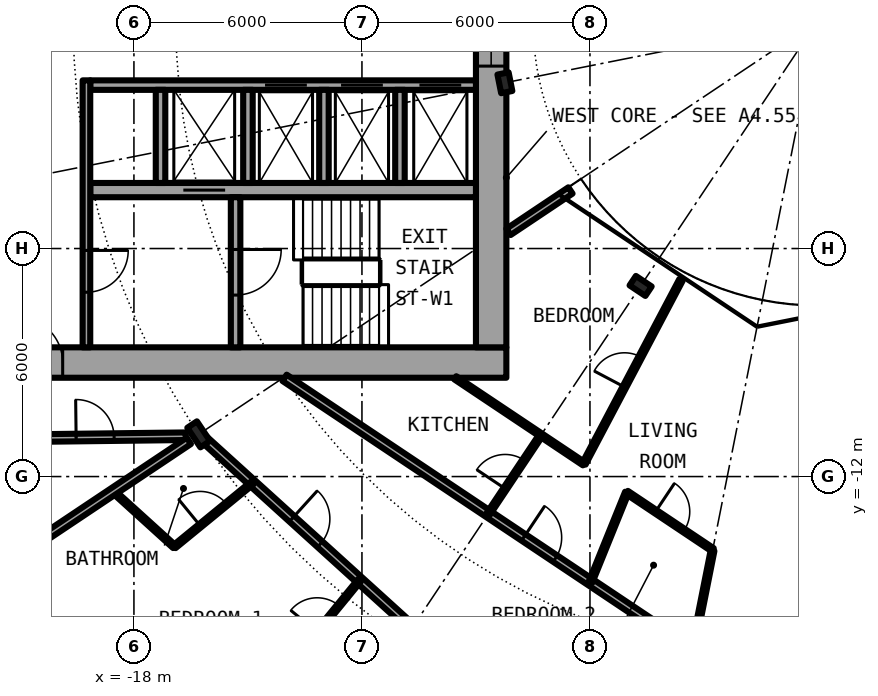
"""IFC4 building model, lengths in metres.
Left out: names, types, materials, properties, quantities, classifications, styles, units other than length and angle.
Written with IfcOpenShell. Run it as: python <this file> out.ifc"""

import sys

from ifc_helpers import new_model, si_unit, direction, frame, frame_2d, origin, origin_2d, place, context, subcontext, project, spatial, rectangle, i_section, extrude, element, fill, save


model = new_model("IFC4")
c1 = context("Model", 3, precision=1e-05, world=origin(), true_north=direction((0.0, 1.0)))
c2 = subcontext(c1, "Body", "Model", "MODEL_VIEW")
j1 = project(units=[si_unit("LENGTHUNIT", "METRE"), si_unit("PLANEANGLEUNIT", "RADIAN")], contexts=[c1])
p1 = place(None, origin())
s1 = spatial("IfcSite", under=j1, at=p1, CompositionType="ELEMENT")
p2 = place(p1, origin())
s2 = spatial("IfcBuilding", under=s1, at=p2, CompositionType="ELEMENT")
p3 = place(p2, frame((0.0, 0.0, 28.9)))
s3 = spatial("IfcBuildingStorey", under=s2, at=p3, CompositionType="ELEMENT", Elevation=28.9)
p4 = place(p3, frame((-16.297, -10.889, 0.0), z_axis=(0.0, 0.0, 1.0), x_axis=(-0.831469612303, -0.55557023302, 0.0)))
e1 = element("IfcColumn", 1, at=p4, inside=s3, PredefinedType="COLUMN", context=c2, shape_type="SweptSolid", body=[
    extrude(i_section(OverallWidth=0.305, OverallDepth=0.62, WebThickness=0.021, FlangeThickness=0.04, FilletRadius=0.027, at=origin_2d()), origin(), (0.0, 0.0, 1.0), 3.05),
])
for number, where, z_axis, x_axis in (
    (2, (-8.239, -1.639, 0.0), (0.0, 0.0, 1.0), (-0.981, -0.195, 0.0)),
    (3, (-4.667, -6.984, 0.0), (0.0, 0.0, 1.0), (-0.556, -0.831, 0.0)),
):
    element("IfcColumn", number, at=place(p3, frame(where, z_axis=z_axis, x_axis=x_axis)), inside=s3, PredefinedType="COLUMN", context=c2, shape_type="SweptSolid", body=[
        extrude(i_section(OverallWidth=0.3, OverallDepth=0.5, WebThickness=0.014, FlangeThickness=0.028, FilletRadius=0.027, at=origin_2d()), origin(), (0.0, 0.0, 1.0), 3.05),
    ])
p5 = place(p3, frame((-22.699, -15.167, 0.0), z_axis=(0.0, 0.0, 1.0), x_axis=(0.634382322723, -0.773019449054, 0.0)))
e4 = element("IfcWall", 4, at=p5, inside=s3, PredefinedType="SOLIDWALL", context=c2, shape_type="SweptSolid", body=[
    extrude(rectangle(XDim=5.352, YDim=0.25, at=frame_2d((2.676, 0.0))), origin(), (0.0, 0.0, 1.0), 2.7),
])
p6 = place(p5, frame((0.441, 0.0, 0.3)))
e5 = element("IfcOpeningElement", 5, at=p6, cuts=e4, PredefinedType="OPENING", context=c2, shape_type="SweptSolid", body=[
    extrude(rectangle(XDim=1.8, YDim=2.1, at=frame_2d((0.9, 1.05))), frame((0.0, 0.135, 0.0), z_axis=(0.0, -1.0, 0.0), x_axis=(1.0, 0.0, 0.0)), (0.0, 0.0, 1.0), 0.27),
])
p7 = place(p5, frame((3.51, 0.0, 0.0)))
e6 = element("IfcOpeningElement", 6, at=p7, cuts=e4, PredefinedType="OPENING", context=c2, shape_type="SweptSolid", body=[
    extrude(rectangle(XDim=1.0, YDim=2.2, at=frame_2d((0.5, 1.1))), frame((0.0, 0.135, 0.0), z_axis=(0.0, -1.0, 0.0), x_axis=(1.0, 0.0, 0.0)), (0.0, 0.0, 1.0), 0.27),
])
p8 = place(p3, frame((-22.4, -9.0, 0.0), z_axis=(0.0, 0.0, 1.0), x_axis=(1.0, 0.0, 0.0)))
e7 = element("IfcWall", 7, at=p8, inside=s3, PredefinedType="SHEAR", context=c2, shape_type="SweptSolid", body=[
    extrude(rectangle(XDim=14.2, YDim=0.8, at=frame_2d((7.1, 0.0))), origin(), (0.0, 0.0, 1.0), 3.05),
])
p9 = place(p8, frame((1.325, 0.0, 0.0)))
e8 = element("IfcOpeningElement", 8, at=p9, cuts=e7, PredefinedType="OPENING", context=c2, shape_type="SweptSolid", body=[
    extrude(rectangle(XDim=1.2, YDim=2.3, at=frame_2d((0.6, 1.15))), frame((0.0, 0.41, 0.0), z_axis=(0.0, -1.0, 0.0), x_axis=(1.0, 0.0, 0.0)), (0.0, 0.0, 1.0), 0.82),
])
p10 = place(p3, frame((-8.6, 8.6, 0.0), z_axis=(0.0, 0.0, 1.0), x_axis=(0.0, -1.0, 0.0)))
e9 = element("IfcWall", 9, at=p10, inside=s3, PredefinedType="SHEAR", context=c2, shape_type="SweptSolid", body=[
    extrude(rectangle(XDim=17.2, YDim=0.8, at=frame_2d((8.6, 0.0))), origin(), (0.0, 0.0, 1.0), 3.05),
])
p11 = place(p10, frame((7.4, 0.0, 0.1)))
e10 = element("IfcOpeningElement", 10, at=p11, cuts=e9, PredefinedType="OPENING", context=c2, shape_type="SweptSolid", body=[
    extrude(rectangle(XDim=2.4, YDim=2.2, at=frame_2d((1.2, 1.1))), frame((0.0, 0.41, 0.0), z_axis=(0.0, -1.0, 0.0), x_axis=(1.0, 0.0, 0.0)), (0.0, 0.0, 1.0), 0.82),
])
p12 = place(p3, frame((-9.0, -1.7, 0.0), z_axis=(0.0, 0.0, 1.0), x_axis=(-1.0, 0.0, 0.0)))
e11 = element("IfcWall", 11, at=p12, inside=s3, PredefinedType="SHEAR", context=c2, shape_type="SweptSolid", body=[
    extrude(rectangle(XDim=10.15, YDim=0.25, at=frame_2d((5.075, 0.0))), origin(), (0.0, 0.0, 1.0), 3.05),
])
p13 = place(p12, frame((0.387, 0.0, 0.0)))
e12 = element("IfcOpeningElement", 12, at=p13, cuts=e11, PredefinedType="OPENING", context=c2, shape_type="SweptSolid", body=[
    extrude(rectangle(XDim=1.1, YDim=2.3, at=frame_2d((0.55, 1.15))), frame((0.0, 0.135, 0.0), z_axis=(0.0, -1.0, 0.0), x_axis=(1.0, 0.0, 0.0)), (0.0, 0.0, 1.0), 0.27),
])
p14 = place(p12, frame((2.45, 0.0, 0.0)))
e13 = element("IfcOpeningElement", 13, at=p14, cuts=e11, PredefinedType="OPENING", context=c2, shape_type="SweptSolid", body=[
    extrude(rectangle(XDim=1.1, YDim=2.3, at=frame_2d((0.55, 1.15))), frame((0.0, 0.135, 0.0), z_axis=(0.0, -1.0, 0.0), x_axis=(1.0, 0.0, 0.0)), (0.0, 0.0, 1.0), 0.27),
])
p15 = place(p12, frame((4.45, 0.0, 0.0)))
e14 = element("IfcOpeningElement", 14, at=p15, cuts=e11, PredefinedType="OPENING", context=c2, shape_type="SweptSolid", body=[
    extrude(rectangle(XDim=1.1, YDim=2.3, at=frame_2d((0.55, 1.15))), frame((0.0, 0.135, 0.0), z_axis=(0.0, -1.0, 0.0), x_axis=(1.0, 0.0, 0.0)), (0.0, 0.0, 1.0), 0.27),
])
p16 = place(p3, frame((-9.0, -4.462, 0.0), z_axis=(0.0, 0.0, 1.0), x_axis=(-1.0, 0.0, 0.0)))
e15 = element("IfcWall", 15, at=p16, inside=s3, PredefinedType="SHEAR", context=c2, shape_type="SweptSolid", body=[
    extrude(rectangle(XDim=10.15, YDim=0.375, at=frame_2d((5.075, 0.0))), origin(), (0.0, 0.0, 1.0), 3.05),
])
p17 = place(p16, frame((6.6, 0.0, 0.0)))
e16 = element("IfcOpeningElement", 16, at=p17, cuts=e15, PredefinedType="OPENING", context=c2, shape_type="SweptSolid", body=[
    extrude(rectangle(XDim=1.1, YDim=2.3, at=frame_2d((0.55, 1.15))), frame((0.0, 0.198, 0.0), z_axis=(0.0, -1.0, 0.0), x_axis=(1.0, 0.0, 0.0)), (0.0, 0.0, 1.0), 0.395),
])
p18 = place(p3, frame((-15.325, -4.65, 0.0), z_axis=(0.0, 0.0, 1.0), x_axis=(0.0, -1.0, 0.0)))
e17 = element("IfcWall", 17, at=p18, inside=s3, PredefinedType="SHEAR", context=c2, shape_type="SweptSolid", body=[
    extrude(rectangle(XDim=3.95, YDim=0.25, at=frame_2d((1.975, 0.0))), origin(), (0.0, 0.0, 1.0), 3.05),
])
p19 = place(p18, frame((1.375, 0.0, 0.0)))
e18 = element("IfcOpeningElement", 18, at=p19, cuts=e17, PredefinedType="OPENING", context=c2, shape_type="SweptSolid", body=[
    extrude(rectangle(XDim=1.2, YDim=2.3, at=frame_2d((0.6, 1.15))), frame((0.0, 0.135, 0.0), z_axis=(0.0, -1.0, 0.0), x_axis=(1.0, 0.0, 0.0)), (0.0, 0.0, 1.0), 0.27),
])
for number, where, z_axis, x_axis in (
    (19, (-15.0, -1.825, 0.0), (0.0, 0.0, 1.0), (0.0, -1.0, 0.0)),
    (20, (-17.3, -1.825, 0.0), (0.0, 0.0, 1.0), (0.0, -1.0, 0.0)),
):
    element("IfcWall", number, at=place(p3, frame(where, z_axis=z_axis, x_axis=x_axis)), inside=s3, PredefinedType="SOLIDWALL", context=c2, shape_type="SweptSolid", body=[
        extrude(rectangle(XDim=2.45, YDim=0.25, at=frame_2d((1.225, 0.0))), origin(), (0.0, 0.0, 1.0), 2.7),
    ])
p20 = place(p3, frame((-19.25, -1.575, 0.0), z_axis=(0.0, 0.0, 1.0), x_axis=(0.0, -1.0, 0.0)))
e21 = element("IfcWall", 21, at=p20, inside=s3, PredefinedType="SOLIDWALL", context=c2, shape_type="SweptSolid", body=[
    extrude(rectangle(XDim=7.025, YDim=0.2, at=frame_2d((3.513, 0.0))), origin(), (0.0, 0.0, 1.0), 2.7),
])
p21 = place(p20, frame((4.475, 0.0, 0.0)))
e22 = element("IfcOpeningElement", 22, at=p21, cuts=e21, PredefinedType="OPENING", context=c2, shape_type="SweptSolid", body=[
    extrude(rectangle(XDim=1.1, YDim=2.3, at=frame_2d((0.55, 1.15))), frame((0.0, 0.11, 0.0), z_axis=(0.0, -1.0, 0.0), x_axis=(1.0, 0.0, 0.0)), (0.0, 0.0, 1.0), 0.22),
])
for number, where, z_axis, x_axis in (
    (23, (-11.0, -1.825, 0.0), (0.0, 0.0, 1.0), (0.0, -1.0, 0.0)),
    (24, (-13.0, -1.825, 0.0), (0.0, 0.0, 1.0), (0.0, -1.0, 0.0)),
):
    element("IfcWall", number, at=place(p3, frame(where, z_axis=z_axis, x_axis=x_axis)), inside=s3, PredefinedType="SOLIDWALL", context=c2, shape_type="SweptSolid", body=[
        extrude(rectangle(XDim=2.45, YDim=0.25, at=frame_2d((1.225, 0.0))), origin(), (0.0, 0.0, 1.0), 2.7),
    ])
p22 = place(p3, frame((-18.542, -12.389, 0.0), z_axis=(0.0, 0.0, 1.0), x_axis=(0.740836325503, -0.671685595212, 0.0)))
e25 = element("IfcWall", 25, at=p22, inside=s3, PredefinedType="PARTITIONING", context=c2, shape_type="SweptSolid", body=[
    extrude(rectangle(XDim=2.168, YDim=0.1, at=frame_2d((1.084, 0.0))), origin(), (0.0, 0.0, 1.0), 2.7),
])
p23 = place(p3, frame((-16.18, -10.994, 0.0), z_axis=(0.0, 0.0, 1.0), x_axis=(0.74089212117, -0.671624050186, 0.0)))
e26 = element("IfcWall", 26, at=p23, inside=s3, PredefinedType="PARTITIONING", context=c2, shape_type="SweptSolid", body=[
    extrude(rectangle(XDim=9.368, YDim=0.2, at=frame_2d((4.684, 0.0))), origin(), (0.0, 0.0, 1.0), 2.38),
])
p24 = place(p23, frame((3.153, 0.0, 0.0)))
e27 = element("IfcOpeningElement", 27, at=p24, cuts=e26, PredefinedType="OPENING", context=c2, shape_type="SweptSolid", body=[
    extrude(rectangle(XDim=1.0, YDim=2.3, at=frame_2d((0.5, 1.15))), frame((0.0, 0.11, 0.0), z_axis=(0.0, -1.0, 0.0), x_axis=(1.0, 0.0, 0.0)), (0.0, 0.0, 1.0), 0.22),
])
p25 = place(p3, frame((-14.036, -9.402, 0.0), z_axis=(0.0, 0.0, 1.0), x_axis=(0.831561346449, -0.555432918625, 0.0)))
e28 = element("IfcWall", 28, at=p25, inside=s3, PredefinedType="PARTITIONING", context=c2, shape_type="SweptSolid", body=[
    extrude(rectangle(XDim=12.914, YDim=0.2, at=frame_2d((6.457, 0.0))), origin(), (0.0, 0.0, 1.0), 2.7),
])
p26 = place(p25, frame((7.566, 0.0, 0.0)))
e29 = element("IfcOpeningElement", 29, at=p26, cuts=e28, PredefinedType="OPENING", context=c2, shape_type="SweptSolid", body=[
    extrude(rectangle(XDim=1.0, YDim=2.3, at=frame_2d((0.5, 1.15))), frame((0.0, 0.11, 0.0), z_axis=(0.0, -1.0, 0.0), x_axis=(1.0, 0.0, 0.0)), (0.0, 0.0, 1.0), 0.22),
])
p27 = place(p3, frame((-9.545, -9.401, 0.0), z_axis=(0.0, 0.0, 1.0), x_axis=(0.831459707426, -0.555585056429, 0.0)))
e30 = element("IfcWall", 30, at=p27, inside=s3, PredefinedType="PARTITIONING", context=c2, shape_type="SweptSolid", body=[
    extrude(rectangle(XDim=4.073, YDim=0.1, at=frame_2d((2.037, 0.0))), origin(), (0.0, 0.0, 1.0), 2.7),
])
p28 = place(p3, frame((-5.029, -12.418, 0.0), z_axis=(0.0, 0.0, 1.0), x_axis=(0.831538390496, -0.555467285384, 0.0)))
e31 = element("IfcWall", 31, at=p28, inside=s3, PredefinedType="PARTITIONING", context=c2, shape_type="SweptSolid", body=[
    extrude(rectangle(XDim=2.717, YDim=0.1, at=frame_2d((1.358, 0.0))), origin(), (0.0, 0.0, 1.0), 2.7),
])
p29 = place(p28, frame((0.908, 0.0, 0.0)))
e32 = element("IfcOpeningElement", 32, at=p29, cuts=e31, PredefinedType="OPENING", context=c2, shape_type="SweptSolid", body=[
    extrude(rectangle(XDim=0.9, YDim=2.3, at=frame_2d((0.45, 1.15))), frame((0.0, 0.06, 0.0), z_axis=(0.0, -1.0, 0.0), x_axis=(1.0, 0.0, 0.0)), (0.0, 0.0, 1.0), 0.12),
])
p30 = place(p3, frame((-21.675, -11.0, 0.0), z_axis=(0.0, 0.0, 1.0), x_axis=(0.999926652916, 0.012111514691, 0.0)))
e33 = element("IfcWall", 33, at=p30, inside=s3, PredefinedType="PARTITIONING", context=c2, shape_type="SweptSolid", body=[
    extrude(rectangle(XDim=5.04, YDim=0.2, at=frame_2d((2.52, 0.0))), origin(), (0.0, 0.0, 1.0), 2.7),
])
p31 = place(p30, frame((2.154, 0.0, 0.0)))
e34 = element("IfcOpeningElement", 34, at=p31, cuts=e33, PredefinedType="OPENING", context=c2, shape_type="SweptSolid", body=[
    extrude(rectangle(XDim=1.0, YDim=2.3, at=frame_2d((0.5, 1.15))), frame((0.0, 0.11, 0.0), z_axis=(0.0, -1.0, 0.0), x_axis=(1.0, 0.0, 0.0)), (0.0, 0.0, 1.0), 0.22),
])
p32 = place(p3, frame((-6.513, -4.472, 0.0), z_axis=(0.0, 0.0, 1.0), x_axis=(-0.831417956244, -0.555647533996, 0.0)))
e35 = element("IfcWall", 35, at=p32, inside=s3, PredefinedType="PARTITIONING", context=c2, shape_type="SweptSolid", body=[
    extrude(rectangle(XDim=1.962, YDim=0.2, at=frame_2d((0.981, 0.0))), origin(), (0.0, 0.0, 1.0), 2.7),
])
p33 = place(p3, frame((-22.595, -15.097, 0.0), z_axis=(0.0, 0.0, 1.0), x_axis=(0.831465568067, 0.555576285599, 0.0)))
e36 = element("IfcWall", 36, at=p33, inside=s3, PredefinedType="PARTITIONING", context=c2, shape_type="SweptSolid", body=[
    extrude(rectangle(XDim=7.264, YDim=0.2, at=frame_2d((3.632, 0.0))), origin(), (0.0, 0.0, 1.0), 2.7),
])
p34 = place(p3, frame((-17.219, -21.023, 0.0), z_axis=(0.0, 0.0, 1.0), x_axis=(0.633664062855, 0.773608334654, 0.0)))
e37 = element("IfcWall", 37, at=p34, inside=s3, PredefinedType="PARTITIONING", context=c2, shape_type="SweptSolid", body=[
    extrude(rectangle(XDim=8.138, YDim=0.1, at=frame_2d((4.069, 0.0))), origin(), (0.0, 0.0, 1.0), 2.7),
])
p35 = place(p34, frame((6.377, 0.0, 0.0)))
e38 = element("IfcOpeningElement", 38, at=p35, cuts=e37, PredefinedType="OPENING", context=c2, shape_type="SweptSolid", body=[
    extrude(rectangle(XDim=0.9, YDim=2.3, at=frame_2d((0.45, 1.15))), frame((0.0, 0.06, 0.0), z_axis=(0.0, -1.0, 0.0), x_axis=(1.0, 0.0, 0.0)), (0.0, 0.0, 1.0), 0.12),
])
p36 = place(p34, frame((2.308, 0.0, 0.0)))
e39 = element("IfcOpeningElement", 39, at=p36, cuts=e37, PredefinedType="OPENING", context=c2, shape_type="SweptSolid", body=[
    extrude(rectangle(XDim=0.9, YDim=2.3, at=frame_2d((0.45, 1.15))), frame((0.0, 0.06, 0.0), z_axis=(0.0, -1.0, 0.0), x_axis=(1.0, 0.0, 0.0)), (0.0, 0.0, 1.0), 0.12),
])
p37 = place(p3, frame((-16.936, -13.845, 0.0), z_axis=(0.0, 0.0, 1.0), x_axis=(0.774162545943, 0.632986850147, 0.0)))
e40 = element("IfcWall", 40, at=p37, inside=s3, PredefinedType="PARTITIONING", context=c2, shape_type="SweptSolid", body=[
    extrude(rectangle(XDim=2.649, YDim=0.1, at=frame_2d((1.325, 0.0))), origin(), (0.0, 0.0, 1.0), 2.7),
])
p38 = place(p37, frame((0.875, 0.0, 0.0)))
e41 = element("IfcOpeningElement", 41, at=p38, cuts=e40, PredefinedType="OPENING", context=c2, shape_type="SweptSolid", body=[
    extrude(rectangle(XDim=0.9, YDim=2.3, at=frame_2d((0.45, 1.15))), frame((0.0, 0.06, 0.0), z_axis=(0.0, -1.0, 0.0), x_axis=(1.0, 0.0, 0.0)), (0.0, 0.0, 1.0), 0.12),
])
p39 = place(p3, frame((-8.675, -12.982, 0.0), z_axis=(0.0, 0.0, 1.0), x_axis=(0.555625883274, 0.831432425297, 0.0)))
e42 = element("IfcWall", 42, at=p39, inside=s3, PredefinedType="PARTITIONING", context=c2, shape_type="SweptSolid", body=[
    extrude(rectangle(XDim=2.494, YDim=0.1, at=frame_2d((1.247, 0.0))), origin(), (0.0, 0.0, 1.0), 2.7),
])
p40 = place(p39, frame((0.798, 0.0, 0.0)))
e43 = element("IfcOpeningElement", 43, at=p40, cuts=e42, PredefinedType="OPENING", context=c2, shape_type="SweptSolid", body=[
    extrude(rectangle(XDim=0.9, YDim=2.3, at=frame_2d((0.45, 1.15))), frame((0.0, 0.06, 0.0), z_axis=(0.0, -1.0, 0.0), x_axis=(1.0, 0.0, 0.0)), (0.0, 0.0, 1.0), 0.12),
])
p41 = place(p3, frame((-6.159, -11.663, 0.0), z_axis=(0.0, 0.0, 1.0), x_axis=(0.466976820365, 0.884269556889, 0.0)))
e44 = element("IfcWall", 44, at=p41, inside=s3, PredefinedType="PARTITIONING", context=c2, shape_type="SweptSolid", body=[
    extrude(rectangle(XDim=5.469, YDim=0.1, at=frame_2d((2.735, 0.0))), origin(), (0.0, 0.0, 1.0), 2.7),
])
p42 = place(p41, frame((2.284, 0.0, 0.0)))
e45 = element("IfcOpeningElement", 45, at=p42, cuts=e44, PredefinedType="OPENING", context=c2, shape_type="SweptSolid", body=[
    extrude(rectangle(XDim=0.9, YDim=2.3, at=frame_2d((0.45, 1.15))), frame((0.0, 0.06, 0.0), z_axis=(0.0, -1.0, 0.0), x_axis=(1.0, 0.0, 0.0)), (0.0, 0.0, 1.0), 0.12),
])
p43 = place(p3, frame((-5.986, -14.779, 0.0), z_axis=(0.0, 0.0, 1.0), x_axis=(0.375649498413, 0.926761811008, 0.0)))
e46 = element("IfcWall", 46, at=p43, inside=s3, PredefinedType="PARTITIONING", context=c2, shape_type="SweptSolid", body=[
    extrude(rectangle(XDim=2.548, YDim=0.1, at=frame_2d((1.274, 0.0))), origin(), (0.0, 0.0, 1.0), 2.7),
])
p44 = place(p3, frame((-2.774, -13.948, 0.0), z_axis=(0.0, 0.0, 1.0), x_axis=(-0.195338620417, -0.980735858105, 0.0)))
e47 = element("IfcWall", 47, at=p44, inside=s3, PredefinedType="PARTITIONING", context=c2, shape_type="SweptSolid", body=[
    extrude(rectangle(XDim=2.657, YDim=0.1, at=frame_2d((1.329, 0.0))), origin(), (0.0, 0.0, 1.0), 2.7),
])
p45 = place(p13, origin())
e48 = element("IfcDoor", 48, at=p45, inside=s3, OperationType="DOUBLE_DOOR_SLIDING", PredefinedType="DOOR", context=c2, shape_type="SweptSolid", body=[
    extrude(rectangle(XDim=1.1, YDim=2.3, at=frame_2d((0.55, 1.15))), frame((0.0, 0.025, 0.0), z_axis=(0.0, -1.0, 0.0), x_axis=(1.0, 0.0, 0.0)), (0.0, 0.0, 1.0), 0.05),
])
fill(e12, e48)
p46 = place(p14, origin())
e49 = element("IfcDoor", 49, at=p46, inside=s3, OperationType="DOUBLE_DOOR_SLIDING", PredefinedType="DOOR", context=c2, shape_type="SweptSolid", body=[
    extrude(rectangle(XDim=1.1, YDim=2.3, at=frame_2d((0.55, 1.15))), frame((0.0, 0.025, 0.0), z_axis=(0.0, -1.0, 0.0), x_axis=(1.0, 0.0, 0.0)), (0.0, 0.0, 1.0), 0.05),
])
fill(e13, e49)
p47 = place(p15, origin())
e50 = element("IfcDoor", 50, at=p47, inside=s3, OperationType="DOUBLE_DOOR_SLIDING", PredefinedType="DOOR", context=c2, shape_type="SweptSolid", body=[
    extrude(rectangle(XDim=1.1, YDim=2.3, at=frame_2d((0.55, 1.15))), frame((0.0, 0.025, 0.0), z_axis=(0.0, -1.0, 0.0), x_axis=(1.0, 0.0, 0.0)), (0.0, 0.0, 1.0), 0.05),
])
fill(e14, e50)
p48 = place(p17, origin())
e51 = element("IfcDoor", 51, at=p48, inside=s3, OperationType="DOUBLE_DOOR_SLIDING", PredefinedType="DOOR", context=c2, shape_type="SweptSolid", body=[
    extrude(rectangle(XDim=1.1, YDim=2.3, at=frame_2d((0.55, 1.15))), frame((0.0, 0.025, 0.0), z_axis=(0.0, -1.0, 0.0), x_axis=(1.0, 0.0, 0.0)), (0.0, 0.0, 1.0), 0.05),
])
fill(e16, e51)
p49 = place(p19, origin())
e52 = element("IfcDoor", 52, at=p49, inside=s3, OperationType="SINGLE_SWING_LEFT", PredefinedType="DOOR", context=c2, shape_type="SweptSolid", body=[
    extrude(rectangle(XDim=1.2, YDim=2.3, at=frame_2d((0.6, 1.15))), frame((0.0, 0.025, 0.0), z_axis=(0.0, -1.0, 0.0), x_axis=(1.0, 0.0, 0.0)), (0.0, 0.0, 1.0), 0.05),
])
fill(e18, e52)
p50 = place(p21, origin())
e53 = element("IfcDoor", 53, at=p50, inside=s3, OperationType="SINGLE_SWING_LEFT", PredefinedType="DOOR", context=c2, shape_type="SweptSolid", body=[
    extrude(rectangle(XDim=1.1, YDim=2.3, at=frame_2d((0.55, 1.15))), frame((0.0, 0.025, 0.0), z_axis=(0.0, -1.0, 0.0), x_axis=(1.0, 0.0, 0.0)), (0.0, 0.0, 1.0), 0.05),
])
fill(e22, e53)
p51 = place(p9, origin())
e54 = element("IfcDoor", 54, at=p51, inside=s3, OperationType="SINGLE_SWING_RIGHT", PredefinedType="DOOR", context=c2, shape_type="SweptSolid", body=[
    extrude(rectangle(XDim=1.2, YDim=2.3, at=frame_2d((0.6, 1.15))), frame((0.0, 0.025, 0.0), z_axis=(0.0, -1.0, 0.0), x_axis=(1.0, 0.0, 0.0)), (0.0, 0.0, 1.0), 0.05),
])
fill(e8, e54)
p52 = place(p11, origin())
e55 = element("IfcWindow", 55, at=p52, inside=s3, PartitioningType="SINGLE_PANEL", PredefinedType="WINDOW", context=c2, shape_type="SweptSolid", body=[
    extrude(rectangle(XDim=2.4, YDim=2.2, at=frame_2d((1.2, 1.1))), frame((0.0, 0.03, 0.0), z_axis=(0.0, -1.0, 0.0), x_axis=(1.0, 0.0, 0.0)), (0.0, 0.0, 1.0), 0.06),
])
fill(e10, e55)
p53 = place(p24, origin())
e56 = element("IfcDoor", 56, at=p53, inside=s3, OperationType="SINGLE_SWING_LEFT", PredefinedType="DOOR", context=c2, shape_type="SweptSolid", body=[
    extrude(rectangle(XDim=1.0, YDim=2.3, at=frame_2d((0.5, 1.15))), frame((0.0, 0.025, 0.0), z_axis=(0.0, -1.0, 0.0), x_axis=(1.0, 0.0, 0.0)), (0.0, 0.0, 1.0), 0.05),
])
fill(e27, e56)
p54 = place(p38, origin())
e57 = element("IfcDoor", 57, at=p54, inside=s3, OperationType="SINGLE_SWING_LEFT", PredefinedType="DOOR", context=c2, shape_type="SweptSolid", body=[
    extrude(rectangle(XDim=0.9, YDim=2.3, at=frame_2d((0.45, 1.15))), frame((0.0, 0.025, 0.0), z_axis=(0.0, -1.0, 0.0), x_axis=(1.0, 0.0, 0.0)), (0.0, 0.0, 1.0), 0.05),
])
fill(e41, e57)
p55 = place(p35, origin())
e58 = element("IfcDoor", 58, at=p55, inside=s3, OperationType="SINGLE_SWING_RIGHT", PredefinedType="DOOR", context=c2, shape_type="SweptSolid", body=[
    extrude(rectangle(XDim=0.9, YDim=2.3, at=frame_2d((0.45, 1.15))), frame((0.0, 0.025, 0.0), z_axis=(0.0, -1.0, 0.0), x_axis=(1.0, 0.0, 0.0)), (0.0, 0.0, 1.0), 0.05),
])
fill(e38, e58)
p56 = place(p26, origin())
e59 = element("IfcDoor", 59, at=p56, inside=s3, OperationType="SINGLE_SWING_RIGHT", PredefinedType="DOOR", context=c2, shape_type="SweptSolid", body=[
    extrude(rectangle(XDim=1.0, YDim=2.3, at=frame_2d((0.5, 1.15))), frame((0.0, 0.025, 0.0), z_axis=(0.0, -1.0, 0.0), x_axis=(1.0, 0.0, 0.0)), (0.0, 0.0, 1.0), 0.05),
])
fill(e29, e59)
p57 = place(p29, origin())
e60 = element("IfcDoor", 60, at=p57, inside=s3, OperationType="SINGLE_SWING_LEFT", PredefinedType="DOOR", context=c2, shape_type="SweptSolid", body=[
    extrude(rectangle(XDim=0.9, YDim=2.3, at=frame_2d((0.45, 1.15))), frame((0.0, 0.025, 0.0), z_axis=(0.0, -1.0, 0.0), x_axis=(1.0, 0.0, 0.0)), (0.0, 0.0, 1.0), 0.05),
])
fill(e32, e60)
p58 = place(p40, origin())
e61 = element("IfcDoor", 61, at=p58, inside=s3, OperationType="SINGLE_SWING_RIGHT", PredefinedType="DOOR", context=c2, shape_type="SweptSolid", body=[
    extrude(rectangle(XDim=0.9, YDim=2.3, at=frame_2d((0.45, 1.15))), frame((0.0, 0.025, 0.0), z_axis=(0.0, -1.0, 0.0), x_axis=(1.0, 0.0, 0.0)), (0.0, 0.0, 1.0), 0.05),
])
fill(e43, e61)
p59 = place(p42, origin())
e62 = element("IfcDoor", 62, at=p59, inside=s3, OperationType="SINGLE_SWING_LEFT", PredefinedType="DOOR", context=c2, shape_type="SweptSolid", body=[
    extrude(rectangle(XDim=0.9, YDim=2.3, at=frame_2d((0.45, 1.15))), frame((0.0, 0.025, 0.0), z_axis=(0.0, -1.0, 0.0), x_axis=(1.0, 0.0, 0.0)), (0.0, 0.0, 1.0), 0.05),
])
fill(e45, e62)
p60 = place(p31, origin())
e63 = element("IfcDoor", 63, at=p60, inside=s3, OperationType="SINGLE_SWING_RIGHT", PredefinedType="DOOR", context=c2, shape_type="SweptSolid", body=[
    extrude(rectangle(XDim=1.0, YDim=2.3, at=frame_2d((0.5, 1.15))), frame((0.0, 0.025, 0.0), z_axis=(0.0, -1.0, 0.0), x_axis=(1.0, 0.0, 0.0)), (0.0, 0.0, 1.0), 0.05),
])
fill(e34, e63)
save(model, sys.argv[1])
